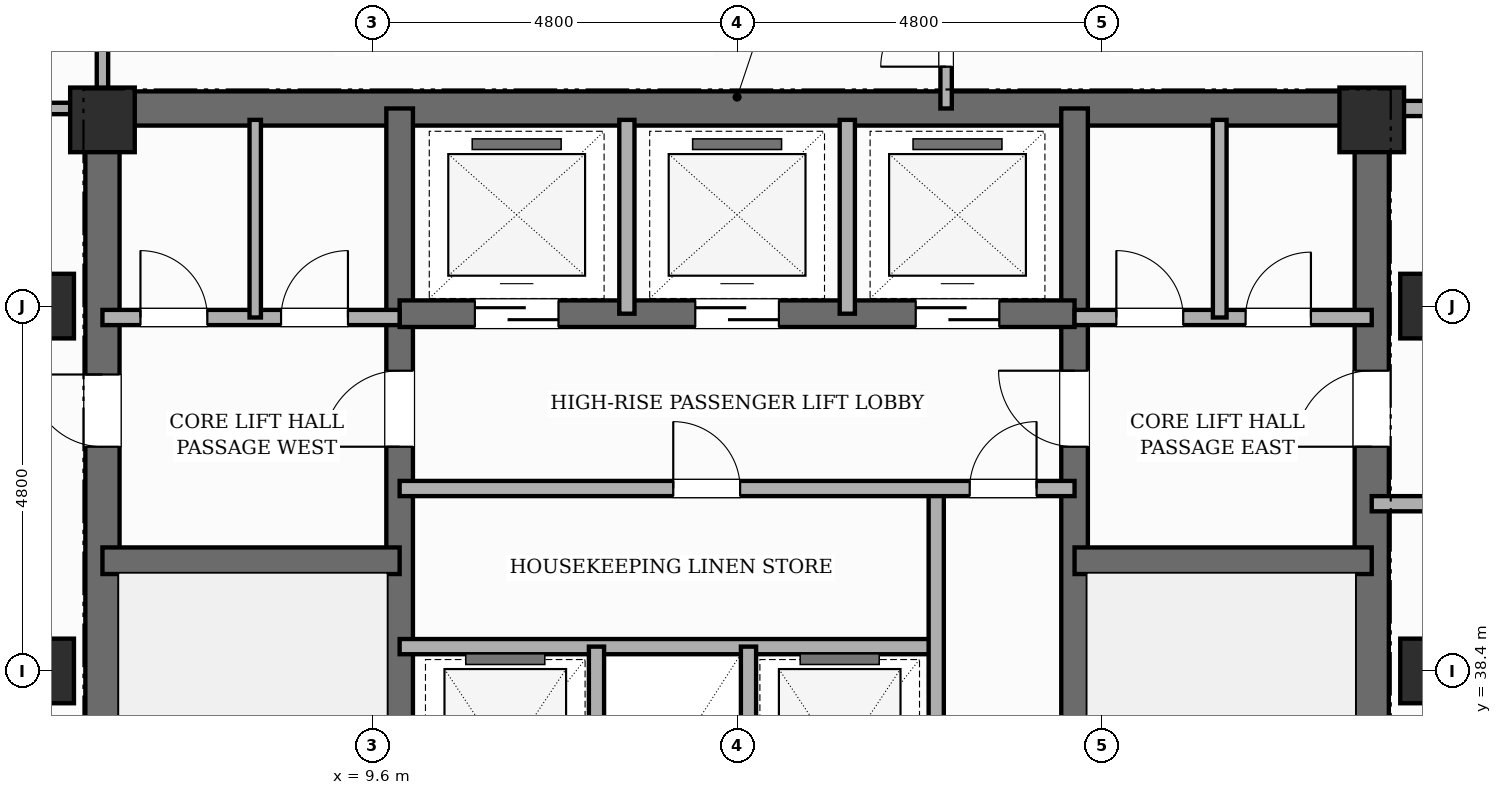
"""IFC4 building model, lengths in metres.
Left out: names, types, materials, properties, quantities, classifications, styles, units other than length and angle.
Written with IfcOpenShell. Run it as: python <this file> out.ifc"""

import sys

from ifc_helpers import new_model, si_unit, direction, frame, frame_2d, origin, origin_2d, place, context, subcontext, project, spatial, rectangle, extrude, element, fill, save


model = new_model("IFC4")
c1 = context("Model", 3, precision=1e-05, world=origin(), true_north=direction((0.0, 1.0)))
c2 = subcontext(c1, "Body", "Model", "MODEL_VIEW")
j1 = project(units=[si_unit("LENGTHUNIT", "METRE"), si_unit("PLANEANGLEUNIT", "RADIAN")], contexts=[c1])
p1 = place(None, origin())
s1 = spatial("IfcSite", under=j1, at=p1, CompositionType="ELEMENT")
p2 = place(p1, origin())
s2 = spatial("IfcBuilding", under=s1, at=p2, CompositionType="ELEMENT")
p3 = place(p2, frame((0.0, 0.0, 203.8)))
s3 = spatial("IfcBuildingStorey", under=s2, at=p3, CompositionType="ELEMENT", Elevation=203.8)
p4 = place(p3, frame((6.05, 30.675, 0.0), z_axis=(0.0, 0.0, 1.0), x_axis=(0.0, 1.0, 0.0)))
e1 = element("IfcWall", 1, at=p4, inside=s3, PredefinedType="SHEAR", context=c2, shape_type="SweptSolid", body=[
    extrude(rectangle(XDim=15.35, YDim=0.45, at=frame_2d((7.675, 0.0))), origin(), (0.0, 0.0, 1.0), 3.6),
])
p5 = place(p4, frame((10.675, 0.0, 0.0)))
e2 = element("IfcOpeningElement", 2, at=p5, cuts=e1, PredefinedType="OPENING", context=c2, shape_type="SweptSolid", body=[
    extrude(rectangle(XDim=0.95, YDim=2.15, at=frame_2d((0.475, 1.075))), frame((0.0, 0.235, 0.0), z_axis=(0.0, -1.0, 0.0), x_axis=(1.0, 0.0, 0.0)), (0.0, 0.0, 1.0), 0.47),
])
p6 = place(p3, frame((22.75, 30.675, 0.0), z_axis=(0.0, 0.0, 1.0), x_axis=(0.0, 1.0, 0.0)))
e3 = element("IfcWall", 3, at=p6, inside=s3, PredefinedType="SHEAR", context=c2, shape_type="SweptSolid", body=[
    extrude(rectangle(XDim=15.35, YDim=0.45, at=frame_2d((7.675, 0.0))), origin(), (0.0, 0.0, 1.0), 3.6),
])
p7 = place(p6, frame((10.675, 0.0, 0.0)))
e4 = element("IfcOpeningElement", 4, at=p7, cuts=e3, PredefinedType="OPENING", context=c2, shape_type="SweptSolid", body=[
    extrude(rectangle(XDim=1.0, YDim=2.15, at=frame_2d((0.5, 1.075))), frame((0.0, 0.235, 0.0), z_axis=(0.0, -1.0, 0.0), x_axis=(1.0, 0.0, 0.0)), (0.0, 0.0, 1.0), 0.47),
])
p8 = place(p3, frame((6.05, 45.8, 0.0), z_axis=(0.0, 0.0, 1.0), x_axis=(1.0, 0.0, 0.0)))
e5 = element("IfcWall", 5, at=p8, inside=s3, PredefinedType="SHEAR", context=c2, shape_type="SweptSolid", body=[
    extrude(rectangle(XDim=16.7, YDim=0.45, at=frame_2d((8.35, 0.0))), origin(), (0.0, 0.0, 1.0), 3.6),
])
p9 = place(p3, frame((9.96, 30.9, 0.0), z_axis=(0.0, 0.0, 1.0), x_axis=(0.0, 1.0, 0.0)))
e6 = element("IfcWall", 6, at=p9, inside=s3, PredefinedType="SHEAR", context=c2, shape_type="SweptSolid", body=[
    extrude(rectangle(XDim=14.9, YDim=0.35, at=frame_2d((7.45, 0.0))), origin(), (0.0, 0.0, 1.0), 3.6),
])
p10 = place(p9, frame((0.65, 0.0, 0.0)))
e7 = element("IfcOpeningElement", 7, at=p10, cuts=e6, PredefinedType="OPENING", context=c2, shape_type="SweptSolid", body=[
    extrude(rectangle(XDim=0.95, YDim=2.1, at=frame_2d((0.475, 1.05))), frame((0.0, 0.185, 0.0), z_axis=(0.0, -1.0, 0.0), x_axis=(1.0, 0.0, 0.0)), (0.0, 0.0, 1.0), 0.37),
])
p11 = place(p9, frame((10.45, 0.0, 0.0)))
e8 = element("IfcOpeningElement", 8, at=p11, cuts=e6, PredefinedType="OPENING", context=c2, shape_type="SweptSolid", body=[
    extrude(rectangle(XDim=1.0, YDim=2.15, at=frame_2d((0.5, 1.075))), frame((0.0, 0.185, 0.0), z_axis=(0.0, -1.0, 0.0), x_axis=(1.0, 0.0, 0.0)), (0.0, 0.0, 1.0), 0.37),
])
p12 = place(p3, frame((18.84, 30.9, 0.0), z_axis=(0.0, 0.0, 1.0), x_axis=(0.0, 1.0, 0.0)))
e9 = element("IfcWall", 9, at=p12, inside=s3, PredefinedType="SHEAR", context=c2, shape_type="SweptSolid", body=[
    extrude(rectangle(XDim=14.9, YDim=0.35, at=frame_2d((7.45, 0.0))), origin(), (0.0, 0.0, 1.0), 3.6),
])
p13 = place(p12, frame((0.65, 0.0, 0.0)))
e10 = element("IfcOpeningElement", 10, at=p13, cuts=e9, PredefinedType="OPENING", context=c2, shape_type="SweptSolid", body=[
    extrude(rectangle(XDim=0.95, YDim=2.1, at=frame_2d((0.475, 1.05))), frame((0.0, 0.185, 0.0), z_axis=(0.0, -1.0, 0.0), x_axis=(1.0, 0.0, 0.0)), (0.0, 0.0, 1.0), 0.37),
])
p14 = place(p12, frame((10.45, 0.0, 0.0)))
e11 = element("IfcOpeningElement", 11, at=p14, cuts=e9, PredefinedType="OPENING", context=c2, shape_type="SweptSolid", body=[
    extrude(rectangle(XDim=1.0, YDim=2.15, at=frame_2d((0.5, 1.075))), frame((0.0, 0.185, 0.0), z_axis=(0.0, -1.0, 0.0), x_axis=(1.0, 0.0, 0.0)), (0.0, 0.0, 1.0), 0.37),
])
for number, where, z_axis, x_axis in (
    (12, (6.05, 39.85, 0.0), (0.0, 0.0, 1.0), (1.0, 0.0, 0.0)),
    (13, (18.84, 39.85, 0.0), (0.0, 0.0, 1.0), (1.0, 0.0, 0.0)),
):
    element("IfcWall", number, at=place(p3, frame(where, z_axis=z_axis, x_axis=x_axis)), inside=s3, PredefinedType="SHEAR", context=c2, shape_type="SweptSolid", body=[
        extrude(rectangle(XDim=3.91, YDim=0.35, at=frame_2d((1.955, 0.0))), origin(), (0.0, 0.0, 1.0), 3.6),
    ])
p15 = place(p3, frame((9.96, 43.1, 0.0), z_axis=(0.0, 0.0, 1.0), x_axis=(1.0, 0.0, 0.0)))
e14 = element("IfcWall", 14, at=p15, inside=s3, PredefinedType="SHEAR", context=c2, shape_type="SweptSolid", body=[
    extrude(rectangle(XDim=8.88, YDim=0.35, at=frame_2d((4.44, 0.0))), origin(), (0.0, 0.0, 1.0), 3.6),
])
p16 = place(p15, frame((0.99, 0.0, 0.0)))
e15 = element("IfcOpeningElement", 15, at=p16, cuts=e14, PredefinedType="OPENING", context=c2, shape_type="SweptSolid", body=[
    extrude(rectangle(XDim=1.1, YDim=2.15, at=frame_2d((0.55, 1.075))), frame((0.0, 0.185, 0.0), z_axis=(0.0, -1.0, 0.0), x_axis=(1.0, 0.0, 0.0)), (0.0, 0.0, 1.0), 0.37),
])
p17 = place(p15, frame((3.89, 0.0, 0.0)))
e16 = element("IfcOpeningElement", 16, at=p17, cuts=e14, PredefinedType="OPENING", context=c2, shape_type="SweptSolid", body=[
    extrude(rectangle(XDim=1.1, YDim=2.15, at=frame_2d((0.55, 1.075))), frame((0.0, 0.185, 0.0), z_axis=(0.0, -1.0, 0.0), x_axis=(1.0, 0.0, 0.0)), (0.0, 0.0, 1.0), 0.37),
])
p18 = place(p15, frame((6.79, 0.0, 0.0)))
e17 = element("IfcOpeningElement", 17, at=p18, cuts=e14, PredefinedType="OPENING", context=c2, shape_type="SweptSolid", body=[
    extrude(rectangle(XDim=1.1, YDim=2.15, at=frame_2d((0.55, 1.075))), frame((0.0, 0.185, 0.0), z_axis=(0.0, -1.0, 0.0), x_axis=(1.0, 0.0, 0.0)), (0.0, 0.0, 1.0), 0.37),
])
for number, where, z_axis, x_axis in (
    (18, (5.25, 38.4, 0.0), (0.0, 0.0, 1.0), (1.0, 0.0, 0.0)),
    (19, (5.25, 43.2, 0.0), (0.0, 0.0, 1.0), (1.0, 0.0, 0.0)),
    (20, (6.05, 45.65, 0.0), (0.0, 0.0, 1.0), (1.0, 0.0, 0.0)),
    (21, (22.75, 45.65, 0.0), (0.0, 0.0, 1.0), (1.0, 0.0, 0.0)),
    (22, (23.55, 38.4, 0.0), (0.0, 0.0, 1.0), (1.0, 0.0, 0.0)),
    (23, (23.55, 43.2, 0.0), (0.0, 0.0, 1.0), (1.0, 0.0, 0.0)),
):
    element("IfcColumn", number, at=place(p3, frame(where, z_axis=z_axis, x_axis=x_axis)), inside=s3, PredefinedType="COLUMN", context=c2, shape_type="SweptSolid", body=[
        extrude(rectangle(XDim=0.85, YDim=0.85, at=origin_2d()), origin(), (0.0, 0.0, 1.0), 3.6),
    ])
p19 = place(p3, frame((9.96, 38.72, 0.0), z_axis=(0.0, 0.0, 1.0), x_axis=(1.0, 0.0, 0.0)))
e24 = element("IfcWall", 24, at=p19, inside=s3, PredefinedType="POLYGONAL", context=c2, shape_type="SweptSolid", body=[
    extrude(rectangle(XDim=7.06, YDim=0.2, at=frame_2d((3.53, 0.0))), origin(), (0.0, 0.0, 1.0), 3.38),
])
for number, where, z_axis, x_axis in (
    (25, (12.55, 35.65, 0.0), (0.0, 0.0, 1.0), (0.0, 1.0, 0.0)),
    (26, (14.55, 35.65, 0.0), (0.0, 0.0, 1.0), (0.0, 1.0, 0.0)),
):
    element("IfcWall", number, at=place(p3, frame(where, z_axis=z_axis, x_axis=x_axis)), inside=s3, PredefinedType="POLYGONAL", context=c2, shape_type="SweptSolid", body=[
        extrude(rectangle(XDim=3.07, YDim=0.2, at=frame_2d((1.535, 0.0))), origin(), (0.0, 0.0, 1.0), 3.38),
    ])
p20 = place(p3, frame((17.02, 35.65, 0.0), z_axis=(0.0, 0.0, 1.0), x_axis=(0.0, 1.0, 0.0)))
e27 = element("IfcWall", 27, at=p20, inside=s3, PredefinedType="POLYGONAL", context=c2, shape_type="SweptSolid", body=[
    extrude(rectangle(XDim=5.15, YDim=0.2, at=frame_2d((2.575, 0.0))), origin(), (0.0, 0.0, 1.0), 3.38),
])
p21 = place(p3, frame((9.96, 40.8, 0.0), z_axis=(0.0, 0.0, 1.0), x_axis=(1.0, 0.0, 0.0)))
e28 = element("IfcWall", 28, at=p21, inside=s3, PredefinedType="POLYGONAL", context=c2, shape_type="SweptSolid", body=[
    extrude(rectangle(XDim=8.88, YDim=0.2, at=frame_2d((4.44, 0.0))), origin(), (0.0, 0.0, 1.0), 3.38),
])
p22 = place(p21, frame((7.5, 0.0, 0.0)))
e29 = element("IfcOpeningElement", 29, at=p22, cuts=e28, PredefinedType="OPENING", context=c2, shape_type="SweptSolid", body=[
    extrude(rectangle(XDim=0.88, YDim=2.1, at=frame_2d((0.44, 1.05))), frame((0.0, 0.11, 0.0), z_axis=(0.0, -1.0, 0.0), x_axis=(1.0, 0.0, 0.0)), (0.0, 0.0, 1.0), 0.22),
])
p23 = place(p21, frame((3.6, 0.0, 0.0)))
e30 = element("IfcOpeningElement", 30, at=p23, cuts=e28, PredefinedType="OPENING", context=c2, shape_type="SweptSolid", body=[
    extrude(rectangle(XDim=0.88, YDim=2.1, at=frame_2d((0.44, 1.05))), frame((0.0, 0.11, 0.0), z_axis=(0.0, -1.0, 0.0), x_axis=(1.0, 0.0, 0.0)), (0.0, 0.0, 1.0), 0.22),
])
p24 = place(p3, frame((18.84, 43.05, 0.0), z_axis=(0.0, 0.0, 1.0), x_axis=(1.0, 0.0, 0.0)))
e31 = element("IfcWall", 31, at=p24, inside=s3, PredefinedType="POLYGONAL", context=c2, shape_type="SweptSolid", body=[
    extrude(rectangle(XDim=3.91, YDim=0.2, at=frame_2d((1.955, 0.0))), origin(), (0.0, 0.0, 1.0), 2.66),
])
p25 = place(p24, frame((0.55, 0.0, 0.0)))
e32 = element("IfcOpeningElement", 32, at=p25, cuts=e31, PredefinedType="OPENING", context=c2, shape_type="SweptSolid", body=[
    extrude(rectangle(XDim=0.88, YDim=2.1, at=frame_2d((0.44, 1.05))), frame((0.0, 0.11, 0.0), z_axis=(0.0, -1.0, 0.0), x_axis=(1.0, 0.0, 0.0)), (0.0, 0.0, 1.0), 0.22),
])
p26 = place(p24, frame((2.25, 0.0, 0.0)))
e33 = element("IfcOpeningElement", 33, at=p26, cuts=e31, PredefinedType="OPENING", context=c2, shape_type="SweptSolid", body=[
    extrude(rectangle(XDim=0.86, YDim=2.1, at=frame_2d((0.43, 1.05))), frame((0.0, 0.11, 0.0), z_axis=(0.0, -1.0, 0.0), x_axis=(1.0, 0.0, 0.0)), (0.0, 0.0, 1.0), 0.22),
])
p27 = place(p3, frame((6.05, 43.05, 0.0), z_axis=(0.0, 0.0, 1.0), x_axis=(1.0, 0.0, 0.0)))
e34 = element("IfcWall", 34, at=p27, inside=s3, PredefinedType="POLYGONAL", context=c2, shape_type="SweptSolid", body=[
    extrude(rectangle(XDim=3.91, YDim=0.2, at=frame_2d((1.955, 0.0))), origin(), (0.0, 0.0, 1.0), 2.66),
])
p28 = place(p27, frame((0.5, 0.0, 0.0)))
e35 = element("IfcOpeningElement", 35, at=p28, cuts=e34, PredefinedType="OPENING", context=c2, shape_type="SweptSolid", body=[
    extrude(rectangle(XDim=0.88, YDim=2.1, at=frame_2d((0.44, 1.05))), frame((0.0, 0.11, 0.0), z_axis=(0.0, -1.0, 0.0), x_axis=(1.0, 0.0, 0.0)), (0.0, 0.0, 1.0), 0.22),
])
p29 = place(p27, frame((2.35, 0.0, 0.0)))
e36 = element("IfcOpeningElement", 36, at=p29, cuts=e34, PredefinedType="OPENING", context=c2, shape_type="SweptSolid", body=[
    extrude(rectangle(XDim=0.88, YDim=2.1, at=frame_2d((0.44, 1.05))), frame((0.0, 0.11, 0.0), z_axis=(0.0, -1.0, 0.0), x_axis=(1.0, 0.0, 0.0)), (0.0, 0.0, 1.0), 0.22),
])
for number, where, z_axis, x_axis in (
    (37, (12.95, 43.1, 0.0), (0.0, 0.0, 1.0), (0.0, 1.0, 0.0)),
    (38, (15.85, 43.1, 0.0), (0.0, 0.0, 1.0), (0.0, 1.0, 0.0)),
):
    element("IfcWall", number, at=place(p3, frame(where, z_axis=z_axis, x_axis=x_axis)), inside=s3, PredefinedType="POLYGONAL", context=c2, shape_type="SweptSolid", body=[
        extrude(rectangle(XDim=2.55, YDim=0.2, at=frame_2d((1.275, 0.0))), origin(), (0.0, 0.0, 1.0), 3.38),
    ])
p30 = place(p3, frame((8.06, 43.05, 0.0), z_axis=(0.0, 0.0, 1.0), x_axis=(0.0, 1.0, 0.0)))
e39 = element("IfcWall", 39, at=p30, inside=s3, PredefinedType="PARTITIONING", context=c2, shape_type="SweptSolid", body=[
    extrude(rectangle(XDim=2.6, YDim=0.15, at=frame_2d((1.3, 0.0))), origin(), (0.0, 0.0, 1.0), 3.38),
])
p31 = place(p3, frame((20.75, 43.05, 0.0), z_axis=(0.0, 0.0, 1.0), x_axis=(0.0, 1.0, 0.0)))
e40 = element("IfcWall", 40, at=p31, inside=s3, PredefinedType="PLUMBINGWALL", context=c2, shape_type="SweptSolid", body=[
    extrude(rectangle(XDim=2.6, YDim=0.18, at=frame_2d((1.3, 0.0))), origin(), (0.0, 0.0, 1.0), 3.38),
])
p32 = place(p3, frame((5.12, 45.8, 0.0), z_axis=(0.0, 0.0, 1.0), x_axis=(1.0, 0.0, 0.0)))
e41 = element("IfcWall", 41, at=p32, inside=s3, PredefinedType="PARTITIONING", context=c2, shape_type="SweptSolid", body=[
    extrude(rectangle(XDim=0.93, YDim=0.15, at=frame_2d((0.465, 0.0))), origin(), (0.0, 0.0, 1.0), 3.38),
])
p33 = place(p3, frame((22.75, 45.8, 0.0), z_axis=(0.0, 0.0, 1.0), x_axis=(1.0, 0.0, 0.0)))
e42 = element("IfcWall", 42, at=p33, inside=s3, PredefinedType="PARTITIONING", context=c2, shape_type="SweptSolid", body=[
    extrude(rectangle(XDim=2.75, YDim=0.2, at=frame_2d((1.375, 0.0))), origin(), (0.0, 0.0, 1.0), 3.38),
])
p34 = place(p3, frame((6.05, 45.8, 0.0), z_axis=(0.0, 0.0, 1.0), x_axis=(0.0, 1.0, 0.0)))
e43 = element("IfcWall", 43, at=p34, inside=s3, PredefinedType="PARTITIONING", context=c2, shape_type="SweptSolid", body=[
    extrude(rectangle(XDim=1.5, YDim=0.15, at=frame_2d((0.75, 0.0))), origin(), (0.0, 0.0, 1.0), 3.38),
])
p35 = place(p3, frame((17.15, 45.8, 0.0), z_axis=(0.0, 0.0, 1.0), x_axis=(0.0, 1.0, 0.0)))
e44 = element("IfcWall", 44, at=p35, inside=s3, PredefinedType="PARTITIONING", context=c2, shape_type="SweptSolid", body=[
    extrude(rectangle(XDim=1.92, YDim=0.15, at=frame_2d((0.96, 0.0))), origin(), (0.0, 0.0, 1.0), 3.38),
])
p36 = place(p35, frame((0.55, 0.0, 0.0)))
e45 = element("IfcOpeningElement", 45, at=p36, cuts=e44, PredefinedType="OPENING", context=c2, shape_type="SweptSolid", body=[
    extrude(rectangle(XDim=0.86, YDim=2.1, at=frame_2d((0.43, 1.05))), frame((0.0, 0.085, 0.0), z_axis=(0.0, -1.0, 0.0), x_axis=(1.0, 0.0, 0.0)), (0.0, 0.0, 1.0), 0.17),
])
p37 = place(p3, frame((22.75, 40.6, 0.0), z_axis=(0.0, 0.0, 1.0), x_axis=(1.0, 0.0, 0.0)))
e46 = element("IfcWall", 46, at=p37, inside=s3, PredefinedType="PARTITIONING", context=c2, shape_type="SweptSolid", body=[
    extrude(rectangle(XDim=3.37, YDim=0.2, at=frame_2d((1.685, 0.0))), origin(), (0.0, 0.0, 1.0), 3.38),
])
p38 = place(p37, frame((0.88, 0.0, 0.0)))
e47 = element("IfcOpeningElement", 47, at=p38, cuts=e46, PredefinedType="OPENING", context=c2, shape_type="SweptSolid", body=[
    extrude(rectangle(XDim=0.86, YDim=2.1, at=frame_2d((0.43, 1.05))), frame((0.0, 0.11, 0.0), z_axis=(0.0, -1.0, 0.0), x_axis=(1.0, 0.0, 0.0)), (0.0, 0.0, 1.0), 0.22),
])
p39 = place(p22, origin())
e48 = element("IfcDoor", 48, at=p39, inside=s3, OperationType="SINGLE_SWING_RIGHT", PredefinedType="DOOR", context=c2, shape_type="SweptSolid", body=[
    extrude(rectangle(XDim=0.88, YDim=2.1, at=frame_2d((0.44, 1.05))), frame((0.0, 0.025, 0.0), z_axis=(0.0, -1.0, 0.0), x_axis=(1.0, 0.0, 0.0)), (0.0, 0.0, 1.0), 0.05),
])
fill(e29, e48)
p40 = place(p16, origin())
e49 = element("IfcDoor", 49, at=p40, inside=s3, OperationType="SLIDING_TO_LEFT", PredefinedType="DOOR", context=c2, shape_type="SweptSolid", body=[
    extrude(rectangle(XDim=1.1, YDim=2.15, at=frame_2d((0.55, 1.075))), frame((0.0, 0.025, 0.0), z_axis=(0.0, -1.0, 0.0), x_axis=(1.0, 0.0, 0.0)), (0.0, 0.0, 1.0), 0.05),
])
fill(e15, e49)
p41 = place(p17, origin())
e50 = element("IfcDoor", 50, at=p41, inside=s3, OperationType="SLIDING_TO_RIGHT", PredefinedType="DOOR", context=c2, shape_type="SweptSolid", body=[
    extrude(rectangle(XDim=1.1, YDim=2.15, at=frame_2d((0.55, 1.075))), frame((0.0, 0.025, 0.0), z_axis=(0.0, -1.0, 0.0), x_axis=(1.0, 0.0, 0.0)), (0.0, 0.0, 1.0), 0.05),
])
fill(e16, e50)
p42 = place(p18, origin())
e51 = element("IfcDoor", 51, at=p42, inside=s3, OperationType="SLIDING_TO_LEFT", PredefinedType="DOOR", context=c2, shape_type="SweptSolid", body=[
    extrude(rectangle(XDim=1.1, YDim=2.15, at=frame_2d((0.55, 1.075))), frame((0.0, 0.025, 0.0), z_axis=(0.0, -1.0, 0.0), x_axis=(1.0, 0.0, 0.0)), (0.0, 0.0, 1.0), 0.05),
])
fill(e17, e51)
p43 = place(p11, origin())
e52 = element("IfcDoor", 52, at=p43, inside=s3, OperationType="SINGLE_SWING_LEFT", PredefinedType="DOOR", context=c2, shape_type="SweptSolid", body=[
    extrude(rectangle(XDim=1.0, YDim=2.15, at=frame_2d((0.5, 1.075))), frame((0.0, 0.025, 0.0), z_axis=(0.0, -1.0, 0.0), x_axis=(1.0, 0.0, 0.0)), (0.0, 0.0, 1.0), 0.05),
])
fill(e8, e52)
p44 = place(p14, origin())
e53 = element("IfcDoor", 53, at=p44, inside=s3, OperationType="SINGLE_SWING_RIGHT", PredefinedType="DOOR", context=c2, shape_type="SweptSolid", body=[
    extrude(rectangle(XDim=1.0, YDim=2.15, at=frame_2d((0.5, 1.075))), frame((0.0, 0.025, 0.0), z_axis=(0.0, -1.0, 0.0), x_axis=(1.0, 0.0, 0.0)), (0.0, 0.0, 1.0), 0.05),
])
fill(e11, e53)
p45 = place(p7, origin())
e54 = element("IfcDoor", 54, at=p45, inside=s3, OperationType="SINGLE_SWING_LEFT", PredefinedType="DOOR", context=c2, shape_type="SweptSolid", body=[
    extrude(rectangle(XDim=1.0, YDim=2.15, at=frame_2d((0.5, 1.075))), frame((0.0, 0.025, 0.0), z_axis=(0.0, -1.0, 0.0), x_axis=(1.0, 0.0, 0.0)), (0.0, 0.0, 1.0), 0.05),
])
fill(e4, e54)
p46 = place(p5, origin())
e55 = element("IfcDoor", 55, at=p46, inside=s3, OperationType="SINGLE_SWING_RIGHT", PredefinedType="DOOR", context=c2, shape_type="SweptSolid", body=[
    extrude(rectangle(XDim=0.95, YDim=2.15, at=frame_2d((0.475, 1.075))), frame((0.0, 0.025, 0.0), z_axis=(0.0, -1.0, 0.0), x_axis=(1.0, 0.0, 0.0)), (0.0, 0.0, 1.0), 0.05),
])
fill(e2, e55)
p47 = place(p28, origin())
e56 = element("IfcDoor", 56, at=p47, inside=s3, OperationType="SINGLE_SWING_LEFT", PredefinedType="DOOR", context=c2, shape_type="SweptSolid", body=[
    extrude(rectangle(XDim=0.88, YDim=2.1, at=frame_2d((0.44, 1.05))), frame((0.0, 0.025, 0.0), z_axis=(0.0, -1.0, 0.0), x_axis=(1.0, 0.0, 0.0)), (0.0, 0.0, 1.0), 0.05),
])
fill(e35, e56)
p48 = place(p29, origin())
e57 = element("IfcDoor", 57, at=p48, inside=s3, OperationType="SINGLE_SWING_RIGHT", PredefinedType="DOOR", context=c2, shape_type="SweptSolid", body=[
    extrude(rectangle(XDim=0.88, YDim=2.1, at=frame_2d((0.44, 1.05))), frame((0.0, 0.025, 0.0), z_axis=(0.0, -1.0, 0.0), x_axis=(1.0, 0.0, 0.0)), (0.0, 0.0, 1.0), 0.05),
])
fill(e36, e57)
p49 = place(p23, origin())
e58 = element("IfcDoor", 58, at=p49, inside=s3, OperationType="SINGLE_SWING_LEFT", PredefinedType="DOOR", context=c2, shape_type="SweptSolid", body=[
    extrude(rectangle(XDim=0.88, YDim=2.1, at=frame_2d((0.44, 1.05))), frame((0.0, 0.025, 0.0), z_axis=(0.0, -1.0, 0.0), x_axis=(1.0, 0.0, 0.0)), (0.0, 0.0, 1.0), 0.05),
])
fill(e30, e58)
p50 = place(p25, origin())
e59 = element("IfcDoor", 59, at=p50, inside=s3, OperationType="SINGLE_SWING_LEFT", PredefinedType="DOOR", context=c2, shape_type="SweptSolid", body=[
    extrude(rectangle(XDim=0.88, YDim=2.1, at=frame_2d((0.44, 1.05))), frame((0.0, 0.025, 0.0), z_axis=(0.0, -1.0, 0.0), x_axis=(1.0, 0.0, 0.0)), (0.0, 0.0, 1.0), 0.05),
])
fill(e32, e59)
p51 = place(p26, origin())
e60 = element("IfcDoor", 60, at=p51, inside=s3, OperationType="SINGLE_SWING_RIGHT", PredefinedType="DOOR", context=c2, shape_type="SweptSolid", body=[
    extrude(rectangle(XDim=0.86, YDim=2.1, at=frame_2d((0.43, 1.05))), frame((0.0, 0.025, 0.0), z_axis=(0.0, -1.0, 0.0), x_axis=(1.0, 0.0, 0.0)), (0.0, 0.0, 1.0), 0.05),
])
fill(e33, e60)
p52 = place(p36, origin())
e61 = element("IfcDoor", 61, at=p52, inside=s3, OperationType="SINGLE_SWING_LEFT", PredefinedType="DOOR", context=c2, shape_type="SweptSolid", body=[
    extrude(rectangle(XDim=0.86, YDim=2.1, at=frame_2d((0.43, 1.05))), frame((0.0, 0.025, 0.0), z_axis=(0.0, -1.0, 0.0), x_axis=(1.0, 0.0, 0.0)), (0.0, 0.0, 1.0), 0.05),
])
fill(e45, e61)
save(model, sys.argv[1])
